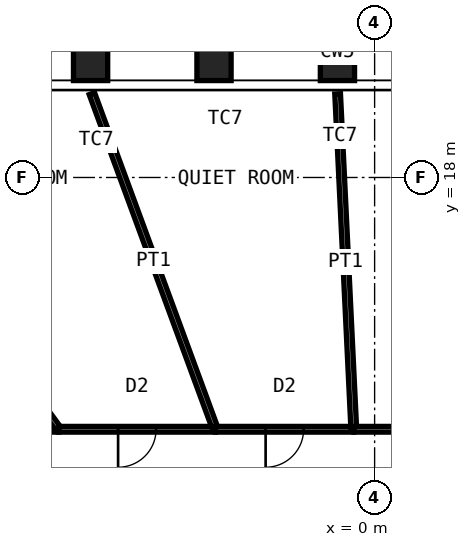
"""IFC4 building model, lengths in metres.
Left out: names, types, materials, properties, quantities, classifications, styles, units other than length and angle.
Written with IfcOpenShell. Run it as: python <this file> out.ifc"""

import sys

from ifc_helpers import new_model, si_unit, direction, frame, frame_2d, origin, origin_2d, place, context, subcontext, project, spatial, rectangle, hollow_rectangle, extrude, element, fill, save


model = new_model("IFC4")
c1 = context("Model", 3, precision=1e-05, world=origin(), true_north=direction((0.0, 1.0)))
c2 = subcontext(c1, "Body", "Model", "MODEL_VIEW")
j1 = project(units=[si_unit("LENGTHUNIT", "METRE"), si_unit("PLANEANGLEUNIT", "RADIAN")], contexts=[c1])
p1 = place(None, origin())
s1 = spatial("IfcSite", under=j1, at=p1, CompositionType="ELEMENT")
p2 = place(p1, origin())
s2 = spatial("IfcBuilding", under=s1, at=p2, CompositionType="ELEMENT")
p3 = place(p2, frame((0.0, 0.0, 274.6)))
s3 = spatial("IfcBuildingStorey", under=s2, at=p3, CompositionType="ELEMENT", Elevation=274.6)
for number, where, z_axis, x_axis in (
    (1, (-7.474, 21.0, 0.0), (0.0, 0.0, 1.0), (-1.0, 0.0, 0.0)),
    (2, (-4.226, 21.0, 0.0), (0.0, 0.0, 1.0), (-1.0, 0.0, 0.0)),
    (3, (-0.978, 21.0, 0.0), (0.0, 0.0, 1.0), (-1.0, 0.0, 0.0)),
):
    element("IfcColumn", number, at=place(p3, frame(where, z_axis=z_axis, x_axis=x_axis)), inside=s3, PredefinedType="COLUMN", context=c2, shape_type="SweptSolid", body=[
        extrude(hollow_rectangle(XDim=0.9, YDim=0.9, WallThickness=0.06, at=origin_2d()), origin(), (0.0, 0.0, 1.0), 4.2),
    ])
p4 = place(p3, frame((-16.475, 11.375, 0.0), z_axis=(0.0, 0.0, 1.0), x_axis=(1.0, 0.0, 0.0)))
e4 = element("IfcWall", 4, at=p4, inside=s3, PredefinedType="PARTITIONING", context=c2, shape_type="SweptSolid", body=[
    extrude(rectangle(XDim=8.163, YDim=0.15, at=frame_2d((4.082, 0.0))), origin(), (0.0, 0.0, 1.0), 4.03),
])
p5 = place(p3, frame((-13.486, 18.455, 0.0), z_axis=(0.0, 0.0, 1.0), x_axis=(0.589997742419, -0.807404894672, 0.0)))
e5 = element("IfcWall", 5, at=p5, inside=s3, PredefinedType="PARTITIONING", context=c2, shape_type="SweptSolid", body=[
    extrude(rectangle(XDim=8.769, YDim=0.15, at=frame_2d((4.385, 0.0))), origin(), (0.0, 0.0, 1.0), 2.93),
])
p6 = place(p3, frame((-8.312, 11.375, 0.0), z_axis=(0.0, 0.0, 1.0), x_axis=(1.0, 0.0, 0.0)))
e6 = element("IfcWall", 6, at=p6, inside=s3, PredefinedType="PARTITIONING", context=c2, shape_type="SweptSolid", body=[
    extrude(rectangle(XDim=4.124, YDim=0.15, at=frame_2d((2.062, 0.0))), origin(), (0.0, 0.0, 1.0), 4.03),
])
p7 = place(p6, frame((1.562, 0.0, 0.0)))
e7 = element("IfcOpeningElement", 7, at=p7, cuts=e6, PredefinedType="OPENING", context=c2, shape_type="SweptSolid", body=[
    extrude(rectangle(XDim=1.0, YDim=2.4, at=frame_2d((0.5, 1.2))), frame((0.0, 0.085, 0.0), z_axis=(0.0, -1.0, 0.0), x_axis=(1.0, 0.0, 0.0)), (0.0, 0.0, 1.0), 0.17),
])
p8 = place(p3, frame((-7.44, 20.206, 0.0), z_axis=(0.0, 0.0, 1.0), x_axis=(0.345510588088, -0.938414851502, 0.0)))
e8 = element("IfcWall", 8, at=p8, inside=s3, PredefinedType="PARTITIONING", context=c2, shape_type="SweptSolid", body=[
    extrude(rectangle(XDim=9.411, YDim=0.15, at=frame_2d((4.705, 0.0))), origin(), (0.0, 0.0, 1.0), 3.33),
])
p9 = place(p3, frame((-4.188, 11.375, 0.0), z_axis=(0.0, 0.0, 1.0), x_axis=(1.0, 0.0, 0.0)))
e9 = element("IfcWall", 9, at=p9, inside=s3, PredefinedType="PARTITIONING", context=c2, shape_type="SweptSolid", body=[
    extrude(rectangle(XDim=3.64, YDim=0.15, at=frame_2d((1.82, 0.0))), origin(), (0.0, 0.0, 1.0), 4.03),
])
p10 = place(p9, frame((1.32, 0.0, 0.0)))
e10 = element("IfcOpeningElement", 10, at=p10, cuts=e9, PredefinedType="OPENING", context=c2, shape_type="SweptSolid", body=[
    extrude(rectangle(XDim=1.0, YDim=2.4, at=frame_2d((0.5, 1.2))), frame((0.0, 0.085, 0.0), z_axis=(0.0, -1.0, 0.0), x_axis=(1.0, 0.0, 0.0)), (0.0, 0.0, 1.0), 0.17),
])
p11 = place(p3, frame((-0.973, 20.2, 0.0), z_axis=(0.0, 0.0, 1.0), x_axis=(0.048134910622, -0.998840843368, 0.0)))
e11 = element("IfcWall", 11, at=p11, inside=s3, PredefinedType="PARTITIONING", context=c2, shape_type="SweptSolid", body=[
    extrude(rectangle(XDim=8.835, YDim=0.15, at=frame_2d((4.418, 0.0))), origin(), (0.0, 0.0, 1.0), 3.33),
])
p12 = place(p3, frame((-0.548, 11.375, 0.0), z_axis=(0.0, 0.0, 1.0), x_axis=(1.0, 0.0, 0.0)))
e12 = element("IfcWall", 12, at=p12, inside=s3, PredefinedType="PARTITIONING", context=c2, shape_type="SweptSolid", body=[
    extrude(rectangle(XDim=10.365, YDim=0.15, at=frame_2d((5.182, 0.0))), origin(), (0.0, 0.0, 1.0), 4.03),
])
p13 = place(p12, frame((4.282, 0.0, 0.0)))
e13 = element("IfcOpeningElement", 13, at=p13, cuts=e12, PredefinedType="OPENING", context=c2, shape_type="SweptSolid", body=[
    extrude(rectangle(XDim=1.8, YDim=2.4, at=frame_2d((0.9, 1.2))), frame((0.0, 0.085, 0.0), z_axis=(0.0, -1.0, 0.0), x_axis=(1.0, 0.0, 0.0)), (0.0, 0.0, 1.0), 0.17),
])
p14 = place(p7, origin())
e14 = element("IfcDoor", 14, at=p14, inside=s3, OperationType="SINGLE_SWING_LEFT", PredefinedType="DOOR", context=c2, shape_type="SweptSolid", body=[
    extrude(rectangle(XDim=1.0, YDim=2.4, at=frame_2d((0.5, 1.2))), frame((0.0, 0.025, 0.0), z_axis=(0.0, -1.0, 0.0), x_axis=(1.0, 0.0, 0.0)), (0.0, 0.0, 1.0), 0.05),
])
fill(e7, e14)
p15 = place(p10, origin())
e15 = element("IfcDoor", 15, at=p15, inside=s3, OperationType="SINGLE_SWING_LEFT", PredefinedType="DOOR", context=c2, shape_type="SweptSolid", body=[
    extrude(rectangle(XDim=1.0, YDim=2.4, at=frame_2d((0.5, 1.2))), frame((0.0, 0.025, 0.0), z_axis=(0.0, -1.0, 0.0), x_axis=(1.0, 0.0, 0.0)), (0.0, 0.0, 1.0), 0.05),
])
fill(e10, e15)
save(model, sys.argv[1])
